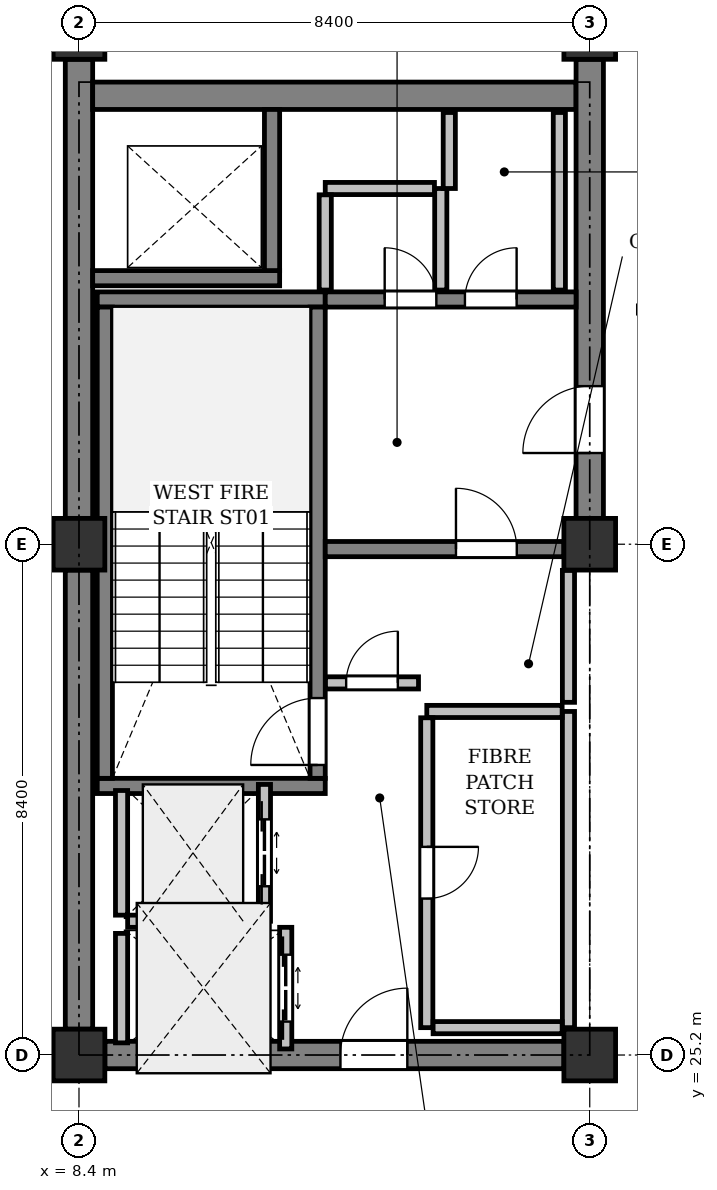
"""IFC4 building model, lengths in metres.
Left out: names, types, materials, properties, quantities, classifications, styles, units other than length and angle.
Written with IfcOpenShell. Run it as: python <this file> out.ifc"""

import sys

from ifc_helpers import new_model, si_unit, direction, frame, frame_2d, origin, origin_2d, place, context, subcontext, project, spatial, rectangle, extrude, element, fill, save


model = new_model("IFC4")
c1 = context("Model", 3, precision=1e-05, world=origin(), true_north=direction((0.0, 1.0)))
c2 = subcontext(c1, "Body", "Model", "MODEL_VIEW")
j1 = project(units=[si_unit("LENGTHUNIT", "METRE"), si_unit("PLANEANGLEUNIT", "RADIAN")], contexts=[c1])
p1 = place(None, origin())
s1 = spatial("IfcSite", under=j1, at=p1, CompositionType="ELEMENT")
p2 = place(p1, origin())
s2 = spatial("IfcBuilding", under=s1, at=p2, CompositionType="ELEMENT")
p3 = place(p2, frame((0.0, 0.0, 262.2)))
s3 = spatial("IfcBuildingStorey", under=s2, at=p3, CompositionType="ELEMENT", Elevation=262.2)
for number, where, z_axis, x_axis in (
    (1, (8.4, 25.2, 0.0), (0.0, 0.0, 1.0), (1.0, 0.0, 0.0)),
    (2, (8.4, 33.6, 0.0), (0.0, 0.0, 1.0), (1.0, 0.0, 0.0)),
    (3, (8.4, 42.0, 0.0), (0.0, 0.0, 1.0), (1.0, 0.0, 0.0)),
    (4, (16.8, 25.2, 0.0), (0.0, 0.0, 1.0), (1.0, 0.0, 0.0)),
    (5, (16.8, 33.6, 0.0), (0.0, 0.0, 1.0), (1.0, 0.0, 0.0)),
    (6, (16.8, 42.0, 0.0), (0.0, 0.0, 1.0), (1.0, 0.0, 0.0)),
):
    element("IfcColumn", number, at=place(p3, frame(where, z_axis=z_axis, x_axis=x_axis)), inside=s3, PredefinedType="COLUMN", context=c2, shape_type="SweptSolid", body=[
        extrude(rectangle(XDim=0.85, YDim=0.85, at=origin_2d()), origin(), (0.0, 0.0, 1.0), 4.0),
    ])
for number, where, z_axis, x_axis in (
    (7, (8.4, 25.625, 0.0), (0.0, 0.0, 1.0), (0.0, 1.0, 0.0)),
    (8, (8.4, 34.025, 0.0), (0.0, 0.0, 1.0), (0.0, 1.0, 0.0)),
):
    element("IfcWall", number, at=place(p3, frame(where, z_axis=z_axis, x_axis=x_axis)), inside=s3, PredefinedType="SHEAR", context=c2, shape_type="SweptSolid", body=[
        extrude(rectangle(XDim=7.55, YDim=0.45, at=frame_2d((3.775, 0.0))), origin(), (0.0, 0.0, 1.0), 3.725),
    ])
p4 = place(p3, frame((8.625, 40.975, 0.0), z_axis=(0.0, 0.0, 1.0), x_axis=(1.0, 0.0, 0.0)))
e9 = element("IfcWall", 9, at=p4, inside=s3, PredefinedType="SHEAR", context=c2, shape_type="SweptSolid", body=[
    extrude(rectangle(XDim=7.95, YDim=0.45, at=frame_2d((3.975, 0.0))), origin(), (0.0, 0.0, 1.0), 3.725),
])
p5 = place(p3, frame((16.8, 34.025, 0.0), z_axis=(0.0, 0.0, 1.0), x_axis=(0.0, 1.0, 0.0)))
e10 = element("IfcWall", 10, at=p5, inside=s3, PredefinedType="SHEAR", context=c2, shape_type="SweptSolid", body=[
    extrude(rectangle(XDim=7.55, YDim=0.45, at=frame_2d((3.775, 0.0))), origin(), (0.0, 0.0, 1.0), 3.725),
])
p6 = place(p5, frame((1.075, 0.0, 0.0)))
e11 = element("IfcOpeningElement", 11, at=p6, cuts=e10, PredefinedType="OPENING", context=c2, shape_type="SweptSolid", body=[
    extrude(rectangle(XDim=1.1, YDim=2.15, at=frame_2d((0.55, 1.075))), frame((0.0, 0.235, 0.0), z_axis=(0.0, -1.0, 0.0), x_axis=(1.0, 0.0, 0.0)), (0.0, 0.0, 1.0), 0.47),
])
p7 = place(p3, frame((8.825, 25.2, 0.0), z_axis=(0.0, 0.0, 1.0), x_axis=(1.0, 0.0, 0.0)))
e12 = element("IfcWall", 12, at=p7, inside=s3, PredefinedType="SHEAR", context=c2, shape_type="SweptSolid", body=[
    extrude(rectangle(XDim=7.55, YDim=0.45, at=frame_2d((3.775, 0.0))), origin(), (0.0, 0.0, 1.0), 3.725),
])
p8 = place(p7, frame((3.875, 0.0, 0.0)))
e13 = element("IfcOpeningElement", 13, at=p8, cuts=e12, PredefinedType="OPENING", context=c2, shape_type="SweptSolid", body=[
    extrude(rectangle(XDim=1.1, YDim=2.15, at=frame_2d((0.55, 1.075))), frame((0.0, 0.235, 0.0), z_axis=(0.0, -1.0, 0.0), x_axis=(1.0, 0.0, 0.0)), (0.0, 0.0, 1.0), 0.47),
])
for number, where, z_axis, x_axis in (
    (14, (12.45, 29.625, 0.0), (0.0, 0.0, 1.0), (-1.0, 0.0, 0.0)),
    (15, (12.45, 37.625, 0.0), (0.0, 0.0, 1.0), (-1.0, 0.0, 0.0)),
):
    element("IfcWall", number, at=place(p3, frame(where, z_axis=z_axis, x_axis=x_axis)), inside=s3, PredefinedType="SHEAR", context=c2, shape_type="SweptSolid", body=[
        extrude(rectangle(XDim=3.75, YDim=0.25, at=frame_2d((1.875, 0.0))), origin(), (0.0, 0.0, 1.0), 3.725),
    ])
p9 = place(p3, frame((12.325, 29.75, 0.0), z_axis=(0.0, 0.0, 1.0), x_axis=(0.0, 1.0, 0.0)))
e16 = element("IfcWall", 16, at=p9, inside=s3, PredefinedType="SHEAR", context=c2, shape_type="SweptSolid", body=[
    extrude(rectangle(XDim=7.75, YDim=0.25, at=frame_2d((3.875, 0.0))), origin(), (0.0, 0.0, 1.0), 3.725),
])
p10 = place(p9, frame((0.22, 0.0, 0.0)))
e17 = element("IfcOpeningElement", 17, at=p10, cuts=e16, PredefinedType="OPENING", context=c2, shape_type="SweptSolid", body=[
    extrude(rectangle(XDim=1.1, YDim=2.15, at=frame_2d((0.55, 1.075))), frame((0.0, 0.135, 0.0), z_axis=(0.0, -1.0, 0.0), x_axis=(1.0, 0.0, 0.0)), (0.0, 0.0, 1.0), 0.27),
])
p11 = place(p3, frame((8.825, 29.75, 0.0), z_axis=(0.0, 0.0, 1.0), x_axis=(0.0, 1.0, 0.0)))
e18 = element("IfcWall", 18, at=p11, inside=s3, PredefinedType="SHEAR", context=c2, shape_type="SweptSolid", body=[
    extrude(rectangle(XDim=7.75, YDim=0.25, at=frame_2d((3.875, 0.0))), origin(), (0.0, 0.0, 1.0), 3.725),
])
p12 = place(p3, frame((8.625, 37.975, 0.0), z_axis=(0.0, 0.0, 1.0), x_axis=(1.0, 0.0, 0.0)))
e19 = element("IfcWall", 19, at=p12, inside=s3, PredefinedType="SHEAR", context=c2, shape_type="SweptSolid", body=[
    extrude(rectangle(XDim=3.075, YDim=0.25, at=frame_2d((1.538, 0.0))), origin(), (0.0, 0.0, 1.0), 3.725),
])
p13 = place(p3, frame((11.575, 38.1, 0.0), z_axis=(0.0, 0.0, 1.0), x_axis=(0.0, 1.0, 0.0)))
e20 = element("IfcWall", 20, at=p13, inside=s3, PredefinedType="SHEAR", context=c2, shape_type="SweptSolid", body=[
    extrude(rectangle(XDim=2.65, YDim=0.25, at=frame_2d((1.325, 0.0))), origin(), (0.0, 0.0, 1.0), 3.725),
])
p14 = place(p3, frame((12.45, 33.52, 0.0), z_axis=(0.0, 0.0, 1.0), x_axis=(1.0, 0.0, 0.0)))
e21 = element("IfcWall", 21, at=p14, inside=s3, PredefinedType="SHEAR", context=c2, shape_type="SweptSolid", body=[
    extrude(rectangle(XDim=3.925, YDim=0.25, at=frame_2d((1.962, 0.0))), origin(), (0.0, 0.0, 1.0), 3.725),
])
p15 = place(p14, frame((2.15, 0.0, 0.0)))
e22 = element("IfcOpeningElement", 22, at=p15, cuts=e21, PredefinedType="OPENING", context=c2, shape_type="SweptSolid", body=[
    extrude(rectangle(XDim=1.0, YDim=2.15, at=frame_2d((0.5, 1.075))), frame((0.0, 0.135, 0.0), z_axis=(0.0, -1.0, 0.0), x_axis=(1.0, 0.0, 0.0)), (0.0, 0.0, 1.0), 0.27),
])
p16 = place(p3, frame((12.45, 37.625, 0.0), z_axis=(0.0, 0.0, 1.0), x_axis=(1.0, 0.0, 0.0)))
e23 = element("IfcWall", 23, at=p16, inside=s3, PredefinedType="SHEAR", context=c2, shape_type="SweptSolid", body=[
    extrude(rectangle(XDim=4.125, YDim=0.25, at=frame_2d((2.062, 0.0))), origin(), (0.0, 0.0, 1.0), 3.725),
])
p17 = place(p16, frame((0.978, 0.0, 0.0)))
e24 = element("IfcOpeningElement", 24, at=p17, cuts=e23, PredefinedType="OPENING", context=c2, shape_type="SweptSolid", body=[
    extrude(rectangle(XDim=0.85, YDim=2.15, at=frame_2d((0.425, 1.075))), frame((0.0, 0.135, 0.0), z_axis=(0.0, -1.0, 0.0), x_axis=(1.0, 0.0, 0.0)), (0.0, 0.0, 1.0), 0.27),
])
p18 = place(p16, frame((2.298, 0.0, 0.0)))
e25 = element("IfcOpeningElement", 25, at=p18, cuts=e23, PredefinedType="OPENING", context=c2, shape_type="SweptSolid", body=[
    extrude(rectangle(XDim=0.85, YDim=2.15, at=frame_2d((0.425, 1.075))), frame((0.0, 0.135, 0.0), z_axis=(0.0, -1.0, 0.0), x_axis=(1.0, 0.0, 0.0)), (0.0, 0.0, 1.0), 0.27),
])
p19 = place(p3, frame((11.45, 27.4, 0.0), z_axis=(0.0, 0.0, 1.0), x_axis=(0.0, 1.0, 0.0)))
e26 = element("IfcWall", 26, at=p19, inside=s3, PredefinedType="PARTITIONING", context=c2, shape_type="SweptSolid", body=[
    extrude(rectangle(XDim=2.25, YDim=0.2, at=frame_2d((1.125, 0.0))), origin(), (0.0, 0.0, 1.0), 3.725),
])
p20 = place(p19, frame((0.575, 0.0, 0.0)))
e27 = element("IfcOpeningElement", 27, at=p20, cuts=e26, PredefinedType="OPENING", context=c2, shape_type="SweptSolid", body=[
    extrude(rectangle(XDim=1.1, YDim=2.2, at=frame_2d((0.55, 1.1))), frame((0.0, 0.11, 0.0), z_axis=(0.0, -1.0, 0.0), x_axis=(1.0, 0.0, 0.0)), (0.0, 0.0, 1.0), 0.22),
])
p21 = place(p3, frame((9.1, 27.5, 0.0), z_axis=(0.0, 0.0, 1.0), x_axis=(0.0, 1.0, 0.0)))
e28 = element("IfcWall", 28, at=p21, inside=s3, PredefinedType="PARTITIONING", context=c2, shape_type="SweptSolid", body=[
    extrude(rectangle(XDim=2.05, YDim=0.2, at=frame_2d((1.025, 0.0))), origin(), (0.0, 0.0, 1.0), 3.725),
])
p22 = place(p3, frame((9.2, 27.4, 0.0), z_axis=(0.0, 0.0, 1.0), x_axis=(1.0, 0.0, 0.0)))
e29 = element("IfcWall", 29, at=p22, inside=s3, PredefinedType="PARTITIONING", context=c2, shape_type="SweptSolid", body=[
    extrude(rectangle(XDim=2.15, YDim=0.2, at=frame_2d((1.075, 0.0))), origin(), (0.0, 0.0, 1.0), 3.725),
])
p23 = place(p3, frame((11.8, 25.3, 0.0), z_axis=(0.0, 0.0, 1.0), x_axis=(0.0, 1.0, 0.0)))
e30 = element("IfcWall", 30, at=p23, inside=s3, PredefinedType="PARTITIONING", context=c2, shape_type="SweptSolid", body=[
    extrude(rectangle(XDim=2.0, YDim=0.2, at=frame_2d((1.0, 0.0))), origin(), (0.0, 0.0, 1.0), 3.725),
])
p24 = place(p23, frame((0.45, 0.0, 0.0)))
e31 = element("IfcOpeningElement", 31, at=p24, cuts=e30, PredefinedType="OPENING", context=c2, shape_type="SweptSolid", body=[
    extrude(rectangle(XDim=1.1, YDim=2.2, at=frame_2d((0.55, 1.1))), frame((0.0, 0.11, 0.0), z_axis=(0.0, -1.0, 0.0), x_axis=(1.0, 0.0, 0.0)), (0.0, 0.0, 1.0), 0.22),
])
p25 = place(p3, frame((9.1, 25.4, 0.0), z_axis=(0.0, 0.0, 1.0), x_axis=(0.0, 1.0, 0.0)))
e32 = element("IfcWall", 32, at=p25, inside=s3, PredefinedType="PARTITIONING", context=c2, shape_type="SweptSolid", body=[
    extrude(rectangle(XDim=1.8, YDim=0.2, at=frame_2d((0.9, 0.0))), origin(), (0.0, 0.0, 1.0), 3.725),
])
p26 = place(p3, frame((16.45, 25.65, 0.0), z_axis=(0.0, 0.0, 1.0), x_axis=(0.0, 1.0, 0.0)))
e33 = element("IfcWall", 33, at=p26, inside=s3, PredefinedType="PARTITIONING", context=c2, shape_type="SweptSolid", body=[
    extrude(rectangle(XDim=5.2, YDim=0.2, at=frame_2d((2.6, 0.0))), origin(), (0.0, 0.0, 1.0), 3.725),
])
p27 = place(p3, frame((16.346, 30.85, 0.0), z_axis=(0.0, 0.0, 1.0), x_axis=(-1.0, 0.0, 0.0)))
e34 = element("IfcWall", 34, at=p27, inside=s3, PredefinedType="PARTITIONING", context=c2, shape_type="SweptSolid", body=[
    extrude(rectangle(XDim=2.226, YDim=0.2, at=frame_2d((1.113, 0.0))), origin(), (0.0, 0.0, 1.0), 3.725),
])
p28 = place(p3, frame((14.12, 30.746, 0.0), z_axis=(0.0, 0.0, 1.0), x_axis=(0.0, -1.0, 0.0)))
e35 = element("IfcWall", 35, at=p28, inside=s3, PredefinedType="PARTITIONING", context=c2, shape_type="SweptSolid", body=[
    extrude(rectangle(XDim=5.096, YDim=0.2, at=frame_2d((2.548, 0.0))), origin(), (0.0, 0.0, 1.0), 3.725),
])
p29 = place(p28, frame((2.123, 0.0, 0.0)))
e36 = element("IfcOpeningElement", 36, at=p29, cuts=e35, PredefinedType="OPENING", context=c2, shape_type="SweptSolid", body=[
    extrude(rectangle(XDim=0.85, YDim=2.15, at=frame_2d((0.425, 1.075))), frame((0.0, 0.11, 0.0), z_axis=(0.0, -1.0, 0.0), x_axis=(1.0, 0.0, 0.0)), (0.0, 0.0, 1.0), 0.22),
])
p30 = place(p3, frame((14.224, 25.65, 0.0), z_axis=(0.0, 0.0, 1.0), x_axis=(1.0, 0.0, 0.0)))
e37 = element("IfcWall", 37, at=p30, inside=s3, PredefinedType="PARTITIONING", context=c2, shape_type="SweptSolid", body=[
    extrude(rectangle(XDim=2.122, YDim=0.2, at=frame_2d((1.061, 0.0))), origin(), (0.0, 0.0, 1.0), 3.725),
])
p31 = place(p3, frame((12.454, 31.32, 0.0), z_axis=(0.0, 0.0, 1.0), x_axis=(0.999999949061, -0.000319182876, 0.0)))
e38 = element("IfcWall", 38, at=p31, inside=s3, PredefinedType="PARTITIONING", context=c2, shape_type="SweptSolid", body=[
    extrude(rectangle(XDim=1.53, YDim=0.2, at=frame_2d((0.765, 0.0))), origin(), (0.0, 0.0, 1.0), 3.725),
])
p32 = place(p31, frame((0.34, 0.0, 0.0)))
e39 = element("IfcOpeningElement", 39, at=p32, cuts=e38, PredefinedType="OPENING", context=c2, shape_type="SweptSolid", body=[
    extrude(rectangle(XDim=0.85, YDim=2.15, at=frame_2d((0.425, 1.075))), frame((0.0, 0.11, 0.0), z_axis=(0.0, -1.0, 0.0), x_axis=(1.0, 0.0, 0.0)), (0.0, 0.0, 1.0), 0.22),
])
p33 = place(p3, frame((16.45, 31.0, 0.0), z_axis=(0.0, 0.0, 1.0), x_axis=(0.0, 1.0, 0.0)))
e40 = element("IfcWall", 40, at=p33, inside=s3, PredefinedType="PARTITIONING", context=c2, shape_type="SweptSolid", body=[
    extrude(rectangle(XDim=2.17, YDim=0.2, at=frame_2d((1.085, 0.0))), origin(), (0.0, 0.0, 1.0), 3.725),
])
p34 = place(p3, frame((14.35, 37.78, 0.0), z_axis=(0.0, 0.0, 1.0), x_axis=(0.0, 1.0, 0.0)))
e41 = element("IfcWall", 41, at=p34, inside=s3, PredefinedType="PARTITIONING", context=c2, shape_type="SweptSolid", body=[
    extrude(rectangle(XDim=1.67, YDim=0.2, at=frame_2d((0.835, 0.0))), origin(), (0.0, 0.0, 1.0), 2.775),
])
p35 = place(p3, frame((14.246, 39.45, 0.0), z_axis=(0.0, 0.0, 1.0), x_axis=(-1.0, 0.0, 0.0)))
e42 = element("IfcWall", 42, at=p35, inside=s3, PredefinedType="PARTITIONING", context=c2, shape_type="SweptSolid", body=[
    extrude(rectangle(XDim=1.796, YDim=0.2, at=frame_2d((0.898, 0.0))), origin(), (0.0, 0.0, 1.0), 2.775),
])
p36 = place(p3, frame((12.45, 39.346, 0.0), z_axis=(0.0, 0.0, 1.0), x_axis=(0.0, -1.0, 0.0)))
e43 = element("IfcWall", 43, at=p36, inside=s3, PredefinedType="PARTITIONING", context=c2, shape_type="SweptSolid", body=[
    extrude(rectangle(XDim=1.566, YDim=0.2, at=frame_2d((0.783, 0.0))), origin(), (0.0, 0.0, 1.0), 2.775),
])
p37 = place(p3, frame((16.3, 37.78, 0.0), z_axis=(0.0, 0.0, 1.0), x_axis=(0.0, 1.0, 0.0)))
e44 = element("IfcWall", 44, at=p37, inside=s3, PredefinedType="PARTITIONING", context=c2, shape_type="SweptSolid", body=[
    extrude(rectangle(XDim=2.92, YDim=0.2, at=frame_2d((1.46, 0.0))), origin(), (0.0, 0.0, 1.0), 2.775),
])
p38 = place(p3, frame((14.49, 40.7, 0.0), z_axis=(0.0, 0.0, 1.0), x_axis=(0.0, -1.0, 0.0)))
e45 = element("IfcWall", 45, at=p38, inside=s3, PredefinedType="PARTITIONING", context=c2, shape_type="SweptSolid", body=[
    extrude(rectangle(XDim=1.25, YDim=0.2, at=frame_2d((0.625, 0.0))), origin(), (0.0, 0.0, 1.0), 2.775),
])
p39 = place(p6, origin())
e46 = element("IfcDoor", 46, at=p39, inside=s3, OperationType="SINGLE_SWING_LEFT", PredefinedType="DOOR", context=c2, shape_type="SweptSolid", body=[
    extrude(rectangle(XDim=1.1, YDim=2.15, at=frame_2d((0.55, 1.075))), frame((0.0, 0.025, 0.0), z_axis=(0.0, -1.0, 0.0), x_axis=(1.0, 0.0, 0.0)), (0.0, 0.0, 1.0), 0.05),
])
fill(e11, e46)
p40 = place(p8, origin())
e47 = element("IfcDoor", 47, at=p40, inside=s3, OperationType="SINGLE_SWING_RIGHT", PredefinedType="DOOR", context=c2, shape_type="SweptSolid", body=[
    extrude(rectangle(XDim=1.1, YDim=2.15, at=frame_2d((0.55, 1.075))), frame((0.0, 0.025, 0.0), z_axis=(0.0, -1.0, 0.0), x_axis=(1.0, 0.0, 0.0)), (0.0, 0.0, 1.0), 0.05),
])
fill(e13, e47)
p41 = place(p10, origin())
e48 = element("IfcDoor", 48, at=p41, inside=s3, OperationType="SINGLE_SWING_LEFT", PredefinedType="DOOR", context=c2, shape_type="SweptSolid", body=[
    extrude(rectangle(XDim=1.1, YDim=2.15, at=frame_2d((0.55, 1.075))), frame((0.0, 0.025, 0.0), z_axis=(0.0, -1.0, 0.0), x_axis=(1.0, 0.0, 0.0)), (0.0, 0.0, 1.0), 0.05),
])
fill(e17, e48)
p42 = place(p15, origin())
e49 = element("IfcDoor", 49, at=p42, inside=s3, OperationType="SINGLE_SWING_LEFT", PredefinedType="DOOR", context=c2, shape_type="SweptSolid", body=[
    extrude(rectangle(XDim=1.0, YDim=2.15, at=frame_2d((0.5, 1.075))), frame((0.0, 0.025, 0.0), z_axis=(0.0, -1.0, 0.0), x_axis=(1.0, 0.0, 0.0)), (0.0, 0.0, 1.0), 0.05),
])
fill(e22, e49)
p43 = place(p20, origin())
e50 = element("IfcDoor", 50, at=p43, inside=s3, OperationType="DOUBLE_DOOR_SLIDING", PredefinedType="DOOR", context=c2, shape_type="SweptSolid", body=[
    extrude(rectangle(XDim=1.1, YDim=2.2, at=frame_2d((0.55, 1.1))), frame((0.0, 0.025, 0.0), z_axis=(0.0, -1.0, 0.0), x_axis=(1.0, 0.0, 0.0)), (0.0, 0.0, 1.0), 0.05),
])
fill(e27, e50)
p44 = place(p24, origin())
e51 = element("IfcDoor", 51, at=p44, inside=s3, OperationType="DOUBLE_DOOR_SLIDING", PredefinedType="DOOR", context=c2, shape_type="SweptSolid", body=[
    extrude(rectangle(XDim=1.1, YDim=2.2, at=frame_2d((0.55, 1.1))), frame((0.0, 0.025, 0.0), z_axis=(0.0, -1.0, 0.0), x_axis=(1.0, 0.0, 0.0)), (0.0, 0.0, 1.0), 0.05),
])
fill(e31, e51)
p45 = place(p29, origin())
e52 = element("IfcDoor", 52, at=p45, inside=s3, OperationType="SINGLE_SWING_LEFT", PredefinedType="DOOR", context=c2, shape_type="SweptSolid", body=[
    extrude(rectangle(XDim=0.85, YDim=2.15, at=frame_2d((0.425, 1.075))), frame((0.0, 0.025, 0.0), z_axis=(0.0, -1.0, 0.0), x_axis=(1.0, 0.0, 0.0)), (0.0, 0.0, 1.0), 0.05),
])
fill(e36, e52)
p46 = place(p32, origin())
e53 = element("IfcDoor", 53, at=p46, inside=s3, OperationType="SINGLE_SWING_RIGHT", PredefinedType="DOOR", context=c2, shape_type="SweptSolid", body=[
    extrude(rectangle(XDim=0.85, YDim=2.15, at=frame_2d((0.425, 1.075))), frame((0.0, 0.025, 0.0), z_axis=(0.0, -1.0, 0.0), x_axis=(1.0, 0.0, 0.0)), (0.0, 0.0, 1.0), 0.05),
])
fill(e39, e53)
p47 = place(p17, origin())
e54 = element("IfcDoor", 54, at=p47, inside=s3, OperationType="SINGLE_SWING_LEFT", PredefinedType="DOOR", context=c2, shape_type="SweptSolid", body=[
    extrude(rectangle(XDim=0.85, YDim=2.15, at=frame_2d((0.425, 1.075))), frame((0.0, 0.025, 0.0), z_axis=(0.0, -1.0, 0.0), x_axis=(1.0, 0.0, 0.0)), (0.0, 0.0, 1.0), 0.05),
])
fill(e24, e54)
p48 = place(p18, origin())
e55 = element("IfcDoor", 55, at=p48, inside=s3, OperationType="SINGLE_SWING_RIGHT", PredefinedType="DOOR", context=c2, shape_type="SweptSolid", body=[
    extrude(rectangle(XDim=0.85, YDim=2.15, at=frame_2d((0.425, 1.075))), frame((0.0, 0.025, 0.0), z_axis=(0.0, -1.0, 0.0), x_axis=(1.0, 0.0, 0.0)), (0.0, 0.0, 1.0), 0.05),
])
fill(e25, e55)
save(model, sys.argv[1])
